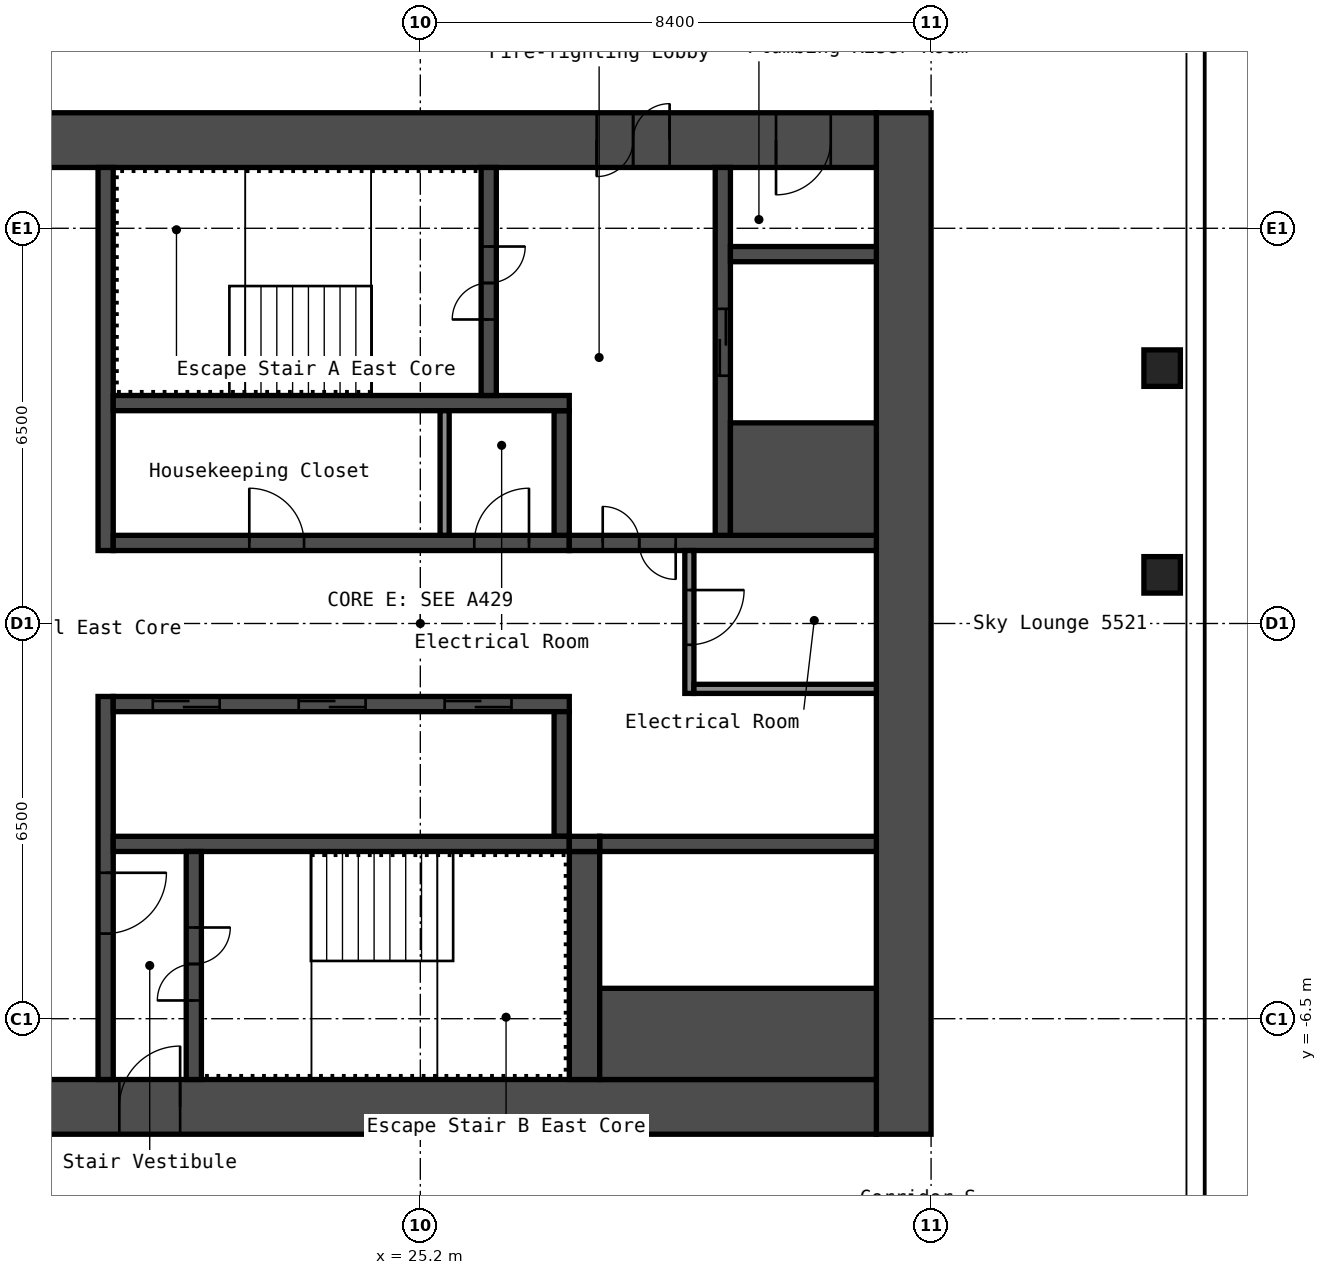
"""IFC4 building model, lengths in metres.
Left out: names, types, materials, properties, quantities, classifications, styles, units other than length and angle.
Written with IfcOpenShell. Run it as: python <this file> out.ifc"""

import sys

from ifc_helpers import new_model, si_unit, direction, frame, frame_2d, origin, origin_2d, place, context, subcontext, project, spatial, rectangle, hollow_rectangle, extrude, element, fill, save


model = new_model("IFC4")
c1 = context("Model", 3, precision=1e-05, world=origin(), true_north=direction((0.0, 1.0)))
c2 = subcontext(c1, "Body", "Model", "MODEL_VIEW")
j1 = project(units=[si_unit("LENGTHUNIT", "METRE"), si_unit("PLANEANGLEUNIT", "RADIAN")], contexts=[c1])
p1 = place(None, origin())
s1 = spatial("IfcSite", under=j1, at=p1, CompositionType="ELEMENT")
p2 = place(p1, origin())
s2 = spatial("IfcBuilding", under=s1, at=p2, CompositionType="ELEMENT")
p3 = place(p2, frame((0.0, 0.0, 196.2)))
s3 = spatial("IfcBuildingStorey", under=s2, at=p3, CompositionType="ELEMENT", Elevation=196.2)
for number, where, z_axis, x_axis in (
    (1, (37.4, 0.8, 0.0), (0.0, 0.0, 1.0), (1.0, 0.0, 0.0)),
    (2, (37.4, 4.2, 0.0), (0.0, 0.0, 1.0), (1.0, 0.0, 0.0)),
):
    element("IfcColumn", number, at=place(p3, frame(where, z_axis=z_axis, x_axis=x_axis)), inside=s3, PredefinedType="COLUMN", context=c2, shape_type="SweptSolid", body=[
        extrude(hollow_rectangle(XDim=0.6, YDim=0.6, WallThickness=0.025, InnerFilletRadius=0.038, OuterFilletRadius=0.062, at=origin_2d()), origin(), (0.0, 0.0, 1.0), 2.75),
    ])
p4 = place(p3, frame((33.15, -8.4, 0.0), z_axis=(0.0, 0.0, 1.0), x_axis=(0.0, 1.0, 0.0)))
e3 = element("IfcWall", 3, at=p4, inside=s3, PredefinedType="SHEAR", context=c2, shape_type="SweptSolid", body=[
    extrude(rectangle(XDim=16.8, YDim=0.9, at=frame_2d((8.4, 0.0))), origin(), (0.0, 0.0, 1.0), 2.75),
])
p5 = place(p3, frame((17.7, 7.95, 0.0), z_axis=(0.0, 0.0, 1.0), x_axis=(1.0, 0.0, 0.0)))
e4 = element("IfcWall", 4, at=p5, inside=s3, PredefinedType="SHEAR", context=c2, shape_type="SweptSolid", body=[
    extrude(rectangle(XDim=15.0, YDim=0.9, at=frame_2d((7.5, 0.0))), origin(), (0.0, 0.0, 1.0), 2.75),
])
p6 = place(p5, frame((10.4, 0.0, 0.0)))
e5 = element("IfcOpeningElement", 5, at=p6, cuts=e4, PredefinedType="OPENING", context=c2, shape_type="SweptSolid", body=[
    extrude(rectangle(XDim=1.2, YDim=2.1, at=frame_2d((0.6, 1.05))), frame((0.0, 0.46, 0.0), z_axis=(0.0, -1.0, 0.0), x_axis=(1.0, 0.0, 0.0)), (0.0, 0.0, 1.0), 0.92),
])
p7 = place(p5, frame((13.35, 0.0, 0.0)))
e6 = element("IfcOpeningElement", 6, at=p7, cuts=e4, PredefinedType="OPENING", context=c2, shape_type="SweptSolid", body=[
    extrude(rectangle(XDim=0.9, YDim=2.1, at=frame_2d((0.45, 1.05))), frame((0.0, 0.46, 0.0), z_axis=(0.0, -1.0, 0.0), x_axis=(1.0, 0.0, 0.0)), (0.0, 0.0, 1.0), 0.92),
])
p8 = place(p3, frame((17.7, -7.95, 0.0), z_axis=(0.0, 0.0, 1.0), x_axis=(1.0, 0.0, 0.0)))
e7 = element("IfcWall", 7, at=p8, inside=s3, PredefinedType="SHEAR", context=c2, shape_type="SweptSolid", body=[
    extrude(rectangle(XDim=15.0, YDim=0.9, at=frame_2d((7.5, 0.0))), origin(), (0.0, 0.0, 1.0), 2.75),
])
p9 = place(p8, frame((2.55, 0.0, 0.0)))
e8 = element("IfcOpeningElement", 8, at=p9, cuts=e7, PredefinedType="OPENING", context=c2, shape_type="SweptSolid", body=[
    extrude(rectangle(XDim=1.0, YDim=2.1, at=frame_2d((0.5, 1.05))), frame((0.0, 0.46, 0.0), z_axis=(0.0, -1.0, 0.0), x_axis=(1.0, 0.0, 0.0)), (0.0, 0.0, 1.0), 0.92),
])
p10 = place(p3, frame((20.025, 1.2, 0.0), z_axis=(0.0, 0.0, 1.0), x_axis=(0.0, 1.0, 0.0)))
e9 = element("IfcWall", 9, at=p10, inside=s3, PredefinedType="SHEAR", context=c2, shape_type="SweptSolid", body=[
    extrude(rectangle(XDim=6.3, YDim=0.25, at=frame_2d((3.15, 0.0))), origin(), (0.0, 0.0, 1.0), 2.75),
])
p11 = place(p3, frame((20.025, -7.5, 0.0), z_axis=(0.0, 0.0, 1.0), x_axis=(0.0, 1.0, 0.0)))
e10 = element("IfcWall", 10, at=p11, inside=s3, PredefinedType="SHEAR", context=c2, shape_type="SweptSolid", body=[
    extrude(rectangle(XDim=6.3, YDim=0.25, at=frame_2d((3.15, 0.0))), origin(), (0.0, 0.0, 1.0), 2.75),
])
p12 = place(p11, frame((2.4, 0.0, 0.0)))
e11 = element("IfcOpeningElement", 11, at=p12, cuts=e10, PredefinedType="OPENING", context=c2, shape_type="SweptSolid", body=[
    extrude(rectangle(XDim=1.0, YDim=2.1, at=frame_2d((0.5, 1.05))), frame((0.0, 0.135, 0.0), z_axis=(0.0, -1.0, 0.0), x_axis=(1.0, 0.0, 0.0)), (0.0, 0.0, 1.0), 0.27),
])
p13 = place(p3, frame((20.15, 1.325, 0.0), z_axis=(0.0, 0.0, 1.0), x_axis=(1.0, 0.0, 0.0)))
e12 = element("IfcWall", 12, at=p13, inside=s3, PredefinedType="SHEAR", context=c2, shape_type="SweptSolid", body=[
    extrude(rectangle(XDim=7.5, YDim=0.25, at=frame_2d((3.75, 0.0))), origin(), (0.0, 0.0, 1.0), 2.75),
])
p14 = place(p13, frame((2.238, 0.0, 0.0)))
e13 = element("IfcOpeningElement", 13, at=p14, cuts=e12, PredefinedType="OPENING", context=c2, shape_type="SweptSolid", body=[
    extrude(rectangle(XDim=0.9, YDim=2.1, at=frame_2d((0.45, 1.05))), frame((0.0, 0.135, 0.0), z_axis=(0.0, -1.0, 0.0), x_axis=(1.0, 0.0, 0.0)), (0.0, 0.0, 1.0), 0.27),
])
p15 = place(p13, frame((5.938, 0.0, 0.0)))
e14 = element("IfcOpeningElement", 14, at=p15, cuts=e12, PredefinedType="OPENING", context=c2, shape_type="SweptSolid", body=[
    extrude(rectangle(XDim=0.9, YDim=2.1, at=frame_2d((0.45, 1.05))), frame((0.0, 0.135, 0.0), z_axis=(0.0, -1.0, 0.0), x_axis=(1.0, 0.0, 0.0)), (0.0, 0.0, 1.0), 0.27),
])
p16 = place(p3, frame((27.525, 1.45, 0.0), z_axis=(0.0, 0.0, 1.0), x_axis=(0.0, 1.0, 0.0)))
e15 = element("IfcWall", 15, at=p16, inside=s3, PredefinedType="SHEAR", context=c2, shape_type="SweptSolid", body=[
    extrude(rectangle(XDim=2.05, YDim=0.25, at=frame_2d((1.025, 0.0))), origin(), (0.0, 0.0, 1.0), 2.75),
])
p17 = place(p3, frame((20.15, 3.625, 0.0), z_axis=(0.0, 0.0, 1.0), x_axis=(1.0, 0.0, 0.0)))
e16 = element("IfcWall", 16, at=p17, inside=s3, PredefinedType="SHEAR", context=c2, shape_type="SweptSolid", body=[
    extrude(rectangle(XDim=7.5, YDim=0.25, at=frame_2d((3.75, 0.0))), origin(), (0.0, 0.0, 1.0), 2.75),
])
p18 = place(p3, frame((26.325, 3.75, 0.0), z_axis=(0.0, 0.0, 1.0), x_axis=(0.0, 1.0, 0.0)))
e17 = element("IfcWall", 17, at=p18, inside=s3, PredefinedType="SHEAR", context=c2, shape_type="SweptSolid", body=[
    extrude(rectangle(XDim=3.75, YDim=0.25, at=frame_2d((1.875, 0.0))), origin(), (0.0, 0.0, 1.0), 2.75),
])
p19 = place(p18, frame((1.25, 0.0, 0.0)))
e18 = element("IfcOpeningElement", 18, at=p19, cuts=e17, PredefinedType="OPENING", context=c2, shape_type="SweptSolid", body=[
    extrude(rectangle(XDim=1.2, YDim=2.1, at=frame_2d((0.6, 1.05))), frame((0.0, 0.135, 0.0), z_axis=(0.0, -1.0, 0.0), x_axis=(1.0, 0.0, 0.0)), (0.0, 0.0, 1.0), 0.27),
])
p20 = place(p3, frame((27.65, 1.325, 0.0), z_axis=(0.0, 0.0, 1.0), x_axis=(1.0, 0.0, 0.0)))
e19 = element("IfcWall", 19, at=p20, inside=s3, PredefinedType="SHEAR", context=c2, shape_type="SweptSolid", body=[
    extrude(rectangle(XDim=5.05, YDim=0.25, at=frame_2d((2.525, 0.0))), origin(), (0.0, 0.0, 1.0), 2.75),
])
p21 = place(p20, frame((0.55, 0.0, 0.0)))
e20 = element("IfcOpeningElement", 20, at=p21, cuts=e19, PredefinedType="OPENING", context=c2, shape_type="SweptSolid", body=[
    extrude(rectangle(XDim=1.2, YDim=2.1, at=frame_2d((0.6, 1.05))), frame((0.0, 0.135, 0.0), z_axis=(0.0, -1.0, 0.0), x_axis=(1.0, 0.0, 0.0)), (0.0, 0.0, 1.0), 0.27),
])
p22 = place(p3, frame((30.175, 1.45, 0.0), z_axis=(0.0, 0.0, 1.0), x_axis=(0.0, 1.0, 0.0)))
e21 = element("IfcWall", 21, at=p22, inside=s3, PredefinedType="SHEAR", context=c2, shape_type="SweptSolid", body=[
    extrude(rectangle(XDim=6.05, YDim=0.25, at=frame_2d((3.025, 0.0))), origin(), (0.0, 0.0, 1.0), 2.75),
])
p23 = place(p22, frame((2.625, 0.0, 0.0)))
e22 = element("IfcOpeningElement", 22, at=p23, cuts=e21, PredefinedType="OPENING", context=c2, shape_type="SweptSolid", body=[
    extrude(rectangle(XDim=1.1, YDim=2.1, at=frame_2d((0.55, 1.05))), frame((0.0, 0.135, 0.0), z_axis=(0.0, -1.0, 0.0), x_axis=(1.0, 0.0, 0.0)), (0.0, 0.0, 1.0), 0.27),
])
p24 = place(p3, frame((30.3, 2.375, 0.0), z_axis=(0.0, 0.0, 1.0), x_axis=(1.0, 0.0, 0.0)))
e23 = element("IfcWall", 23, at=p24, inside=s3, PredefinedType="SHEAR", context=c2, shape_type="SweptSolid", body=[
    extrude(rectangle(XDim=2.4, YDim=1.85, at=frame_2d((1.2, 0.0))), origin(), (0.0, 0.0, 1.0), 2.75),
])
p25 = place(p3, frame((30.3, 6.075, 0.0), z_axis=(0.0, 0.0, 1.0), x_axis=(1.0, 0.0, 0.0)))
e24 = element("IfcWall", 24, at=p25, inside=s3, PredefinedType="SHEAR", context=c2, shape_type="SweptSolid", body=[
    extrude(rectangle(XDim=2.4, YDim=0.25, at=frame_2d((1.2, 0.0))), origin(), (0.0, 0.0, 1.0), 2.75),
])
p26 = place(p3, frame((20.15, -1.325, 0.0), z_axis=(0.0, 0.0, 1.0), x_axis=(1.0, 0.0, 0.0)))
e25 = element("IfcWall", 25, at=p26, inside=s3, PredefinedType="SHEAR", context=c2, shape_type="SweptSolid", body=[
    extrude(rectangle(XDim=7.5, YDim=0.25, at=frame_2d((3.75, 0.0))), origin(), (0.0, 0.0, 1.0), 2.75),
])
p27 = place(p26, frame((0.65, 0.0, 0.0)))
e26 = element("IfcOpeningElement", 26, at=p27, cuts=e25, PredefinedType="OPENING", context=c2, shape_type="SweptSolid", body=[
    extrude(rectangle(XDim=1.1, YDim=2.1, at=frame_2d((0.55, 1.05))), frame((0.0, 0.135, 0.0), z_axis=(0.0, -1.0, 0.0), x_axis=(1.0, 0.0, 0.0)), (0.0, 0.0, 1.0), 0.27),
])
p28 = place(p26, frame((3.05, 0.0, 0.0)))
e27 = element("IfcOpeningElement", 27, at=p28, cuts=e25, PredefinedType="OPENING", context=c2, shape_type="SweptSolid", body=[
    extrude(rectangle(XDim=1.1, YDim=2.1, at=frame_2d((0.55, 1.05))), frame((0.0, 0.135, 0.0), z_axis=(0.0, -1.0, 0.0), x_axis=(1.0, 0.0, 0.0)), (0.0, 0.0, 1.0), 0.27),
])
p29 = place(p26, frame((5.45, 0.0, 0.0)))
e28 = element("IfcOpeningElement", 28, at=p29, cuts=e25, PredefinedType="OPENING", context=c2, shape_type="SweptSolid", body=[
    extrude(rectangle(XDim=1.1, YDim=2.1, at=frame_2d((0.55, 1.05))), frame((0.0, 0.135, 0.0), z_axis=(0.0, -1.0, 0.0), x_axis=(1.0, 0.0, 0.0)), (0.0, 0.0, 1.0), 0.27),
])
p30 = place(p3, frame((27.525, -3.5, 0.0), z_axis=(0.0, 0.0, 1.0), x_axis=(0.0, 1.0, 0.0)))
e29 = element("IfcWall", 29, at=p30, inside=s3, PredefinedType="SHEAR", context=c2, shape_type="SweptSolid", body=[
    extrude(rectangle(XDim=2.05, YDim=0.25, at=frame_2d((1.025, 0.0))), origin(), (0.0, 0.0, 1.0), 2.75),
])
p31 = place(p3, frame((20.15, -3.625, 0.0), z_axis=(0.0, 0.0, 1.0), x_axis=(1.0, 0.0, 0.0)))
e30 = element("IfcWall", 30, at=p31, inside=s3, PredefinedType="SHEAR", context=c2, shape_type="SweptSolid", body=[
    extrude(rectangle(XDim=7.5, YDim=0.25, at=frame_2d((3.75, 0.0))), origin(), (0.0, 0.0, 1.0), 2.75),
])
p32 = place(p3, frame((21.475, -7.5, 0.0), z_axis=(0.0, 0.0, 1.0), x_axis=(0.0, 1.0, 0.0)))
e31 = element("IfcWall", 31, at=p32, inside=s3, PredefinedType="SHEAR", context=c2, shape_type="SweptSolid", body=[
    extrude(rectangle(XDim=3.75, YDim=0.25, at=frame_2d((1.875, 0.0))), origin(), (0.0, 0.0, 1.0), 2.75),
])
p33 = place(p32, frame((1.3, 0.0, 0.0)))
e32 = element("IfcOpeningElement", 32, at=p33, cuts=e31, PredefinedType="OPENING", context=c2, shape_type="SweptSolid", body=[
    extrude(rectangle(XDim=1.2, YDim=2.1, at=frame_2d((0.6, 1.05))), frame((0.0, 0.135, 0.0), z_axis=(0.0, -1.0, 0.0), x_axis=(1.0, 0.0, 0.0)), (0.0, 0.0, 1.0), 0.27),
])
p34 = place(p3, frame((27.9, -7.5, 0.0), z_axis=(0.0, 0.0, 1.0), x_axis=(0.0, 1.0, 0.0)))
e33 = element("IfcWall", 33, at=p34, inside=s3, PredefinedType="SHEAR", context=c2, shape_type="SweptSolid", body=[
    extrude(rectangle(XDim=3.75, YDim=0.5, at=frame_2d((1.875, 0.0))), origin(), (0.0, 0.0, 1.0), 2.75),
])
p35 = place(p3, frame((28.15, -3.625, 0.0), z_axis=(0.0, 0.0, 1.0), x_axis=(1.0, 0.0, 0.0)))
e34 = element("IfcWall", 34, at=p35, inside=s3, PredefinedType="SHEAR", context=c2, shape_type="SweptSolid", body=[
    extrude(rectangle(XDim=4.55, YDim=0.25, at=frame_2d((2.275, 0.0))), origin(), (0.0, 0.0, 1.0), 2.75),
])
p36 = place(p3, frame((28.15, -6.75, 0.0), z_axis=(0.0, 0.0, 1.0), x_axis=(1.0, 0.0, 0.0)))
e35 = element("IfcWall", 35, at=p36, inside=s3, PredefinedType="SHEAR", context=c2, shape_type="SweptSolid", body=[
    extrude(rectangle(XDim=4.55, YDim=1.5, at=frame_2d((2.275, 0.0))), origin(), (0.0, 0.0, 1.0), 2.75),
])
p37 = place(p3, frame((27.65, -3.625, 0.0), z_axis=(0.0, 0.0, 1.0), x_axis=(1.0, 0.0, 0.0)))
e36 = element("IfcWall", 36, at=p37, inside=s3, PredefinedType="SHEAR", context=c2, shape_type="SweptSolid", body=[
    extrude(rectangle(XDim=0.5, YDim=0.25, at=frame_2d((0.25, 0.0))), origin(), (0.0, 0.0, 1.0), 2.75),
])
p38 = place(p3, frame((29.625, -1.15, 0.0), z_axis=(0.0, 0.0, 1.0), x_axis=(0.0, 1.0, 0.0)))
e37 = element("IfcWall", 37, at=p38, inside=s3, PredefinedType="PARTITIONING", context=c2, shape_type="SweptSolid", body=[
    extrude(rectangle(XDim=2.35, YDim=0.15, at=frame_2d((1.175, 0.0))), origin(), (0.0, 0.0, 1.0), 2.75),
])
p39 = place(p38, frame((0.8, 0.0, 0.0)))
e38 = element("IfcOpeningElement", 38, at=p39, cuts=e37, PredefinedType="OPENING", context=c2, shape_type="SweptSolid", body=[
    extrude(rectangle(XDim=0.9, YDim=2.1, at=frame_2d((0.45, 1.05))), frame((0.0, 0.085, 0.0), z_axis=(0.0, -1.0, 0.0), x_axis=(1.0, 0.0, 0.0)), (0.0, 0.0, 1.0), 0.17),
])
p40 = place(p3, frame((29.7, -1.075, 0.0), z_axis=(0.0, 0.0, 1.0), x_axis=(1.0, 0.0, 0.0)))
e39 = element("IfcWall", 39, at=p40, inside=s3, PredefinedType="PARTITIONING", context=c2, shape_type="SweptSolid", body=[
    extrude(rectangle(XDim=3.0, YDim=0.15, at=frame_2d((1.5, 0.0))), origin(), (0.0, 0.0, 1.0), 2.75),
])
p41 = place(p3, frame((25.6, 1.45, 0.0), z_axis=(0.0, 0.0, 1.0), x_axis=(0.0, 1.0, 0.0)))
e40 = element("IfcWall", 40, at=p41, inside=s3, PredefinedType="PARTITIONING", context=c2, shape_type="SweptSolid", body=[
    extrude(rectangle(XDim=2.05, YDim=0.15, at=frame_2d((1.025, 0.0))), origin(), (0.0, 0.0, 1.0), 2.75),
])
p42 = place(p6, origin())
e41 = element("IfcDoor", 41, at=p42, inside=s3, OperationType="DOUBLE_DOOR_SINGLE_SWING", PredefinedType="DOOR", context=c2, shape_type="SweptSolid", body=[
    extrude(rectangle(XDim=1.2, YDim=2.1, at=frame_2d((0.6, 1.05))), frame((0.0, 0.025, 0.0), z_axis=(0.0, -1.0, 0.0), x_axis=(1.0, 0.0, 0.0)), (0.0, 0.0, 1.0), 0.05),
])
fill(e5, e41)
p43 = place(p7, origin())
e42 = element("IfcDoor", 42, at=p43, inside=s3, OperationType="SINGLE_SWING_LEFT", PredefinedType="DOOR", context=c2, shape_type="SweptSolid", body=[
    extrude(rectangle(XDim=0.9, YDim=2.1, at=frame_2d((0.45, 1.05))), frame((0.0, 0.025, 0.0), z_axis=(0.0, -1.0, 0.0), x_axis=(1.0, 0.0, 0.0)), (0.0, 0.0, 1.0), 0.05),
])
fill(e6, e42)
p44 = place(p9, origin())
e43 = element("IfcDoor", 43, at=p44, inside=s3, OperationType="SINGLE_SWING_LEFT", PredefinedType="DOOR", context=c2, shape_type="SweptSolid", body=[
    extrude(rectangle(XDim=1.0, YDim=2.1, at=frame_2d((0.5, 1.05))), frame((0.0, 0.025, 0.0), z_axis=(0.0, -1.0, 0.0), x_axis=(1.0, 0.0, 0.0)), (0.0, 0.0, 1.0), 0.05),
])
fill(e8, e43)
p45 = place(p19, origin())
e44 = element("IfcDoor", 44, at=p45, inside=s3, OperationType="DOUBLE_DOOR_SINGLE_SWING", PredefinedType="DOOR", context=c2, shape_type="SweptSolid", body=[
    extrude(rectangle(XDim=1.2, YDim=2.1, at=frame_2d((0.6, 1.05))), frame((0.0, 0.025, 0.0), z_axis=(0.0, -1.0, 0.0), x_axis=(1.0, 0.0, 0.0)), (0.0, 0.0, 1.0), 0.05),
])
fill(e18, e44)
p46 = place(p33, origin())
e45 = element("IfcDoor", 45, at=p46, inside=s3, OperationType="DOUBLE_DOOR_SINGLE_SWING", PredefinedType="DOOR", context=c2, shape_type="SweptSolid", body=[
    extrude(rectangle(XDim=1.2, YDim=2.1, at=frame_2d((0.6, 1.05))), frame((0.0, 0.025, 0.0), z_axis=(0.0, -1.0, 0.0), x_axis=(1.0, 0.0, 0.0)), (0.0, 0.0, 1.0), 0.05),
])
fill(e32, e45)
p47 = place(p12, origin())
e46 = element("IfcDoor", 46, at=p47, inside=s3, OperationType="SINGLE_SWING_RIGHT", PredefinedType="DOOR", context=c2, shape_type="SweptSolid", body=[
    extrude(rectangle(XDim=1.0, YDim=2.1, at=frame_2d((0.5, 1.05))), frame((0.0, 0.025, 0.0), z_axis=(0.0, -1.0, 0.0), x_axis=(1.0, 0.0, 0.0)), (0.0, 0.0, 1.0), 0.05),
])
fill(e11, e46)
p48 = place(p21, origin())
e47 = element("IfcDoor", 47, at=p48, inside=s3, OperationType="DOUBLE_DOOR_SINGLE_SWING", PredefinedType="DOOR", context=c2, shape_type="SweptSolid", body=[
    extrude(rectangle(XDim=1.2, YDim=2.1, at=frame_2d((0.6, 1.05))), frame((0.0, 0.025, 0.0), z_axis=(0.0, -1.0, 0.0), x_axis=(1.0, 0.0, 0.0)), (0.0, 0.0, 1.0), 0.05),
])
fill(e20, e47)
p49 = place(p39, origin())
e48 = element("IfcDoor", 48, at=p49, inside=s3, OperationType="SINGLE_SWING_RIGHT", PredefinedType="DOOR", context=c2, shape_type="SweptSolid", body=[
    extrude(rectangle(XDim=0.9, YDim=2.1, at=frame_2d((0.45, 1.05))), frame((0.0, 0.025, 0.0), z_axis=(0.0, -1.0, 0.0), x_axis=(1.0, 0.0, 0.0)), (0.0, 0.0, 1.0), 0.05),
])
fill(e38, e48)
p50 = place(p14, origin())
e49 = element("IfcDoor", 49, at=p50, inside=s3, OperationType="SINGLE_SWING_RIGHT", PredefinedType="DOOR", context=c2, shape_type="SweptSolid", body=[
    extrude(rectangle(XDim=0.9, YDim=2.1, at=frame_2d((0.45, 1.05))), frame((0.0, 0.025, 0.0), z_axis=(0.0, -1.0, 0.0), x_axis=(1.0, 0.0, 0.0)), (0.0, 0.0, 1.0), 0.05),
])
fill(e13, e49)
p51 = place(p15, origin())
e50 = element("IfcDoor", 50, at=p51, inside=s3, OperationType="SINGLE_SWING_LEFT", PredefinedType="DOOR", context=c2, shape_type="SweptSolid", body=[
    extrude(rectangle(XDim=0.9, YDim=2.1, at=frame_2d((0.45, 1.05))), frame((0.0, 0.025, 0.0), z_axis=(0.0, -1.0, 0.0), x_axis=(1.0, 0.0, 0.0)), (0.0, 0.0, 1.0), 0.05),
])
fill(e14, e50)
p52 = place(p27, origin())
e51 = element("IfcDoor", 51, at=p52, inside=s3, OperationType="DOUBLE_DOOR_SLIDING", PredefinedType="DOOR", context=c2, shape_type="SweptSolid", body=[
    extrude(rectangle(XDim=1.1, YDim=2.1, at=frame_2d((0.55, 1.05))), frame((0.0, 0.025, 0.0), z_axis=(0.0, -1.0, 0.0), x_axis=(1.0, 0.0, 0.0)), (0.0, 0.0, 1.0), 0.05),
])
fill(e26, e51)
p53 = place(p28, origin())
e52 = element("IfcDoor", 52, at=p53, inside=s3, OperationType="DOUBLE_DOOR_SLIDING", PredefinedType="DOOR", context=c2, shape_type="SweptSolid", body=[
    extrude(rectangle(XDim=1.1, YDim=2.1, at=frame_2d((0.55, 1.05))), frame((0.0, 0.025, 0.0), z_axis=(0.0, -1.0, 0.0), x_axis=(1.0, 0.0, 0.0)), (0.0, 0.0, 1.0), 0.05),
])
fill(e27, e52)
p54 = place(p29, origin())
e53 = element("IfcDoor", 53, at=p54, inside=s3, OperationType="DOUBLE_DOOR_SLIDING", PredefinedType="DOOR", context=c2, shape_type="SweptSolid", body=[
    extrude(rectangle(XDim=1.1, YDim=2.1, at=frame_2d((0.55, 1.05))), frame((0.0, 0.025, 0.0), z_axis=(0.0, -1.0, 0.0), x_axis=(1.0, 0.0, 0.0)), (0.0, 0.0, 1.0), 0.05),
])
fill(e28, e53)
p55 = place(p23, origin())
e54 = element("IfcDoor", 54, at=p55, inside=s3, OperationType="DOUBLE_DOOR_SLIDING", PredefinedType="DOOR", context=c2, shape_type="SweptSolid", body=[
    extrude(rectangle(XDim=1.1, YDim=2.1, at=frame_2d((0.55, 1.05))), frame((0.0, 0.025, 0.0), z_axis=(0.0, -1.0, 0.0), x_axis=(1.0, 0.0, 0.0)), (0.0, 0.0, 1.0), 0.05),
])
fill(e22, e54)
save(model, sys.argv[1])
